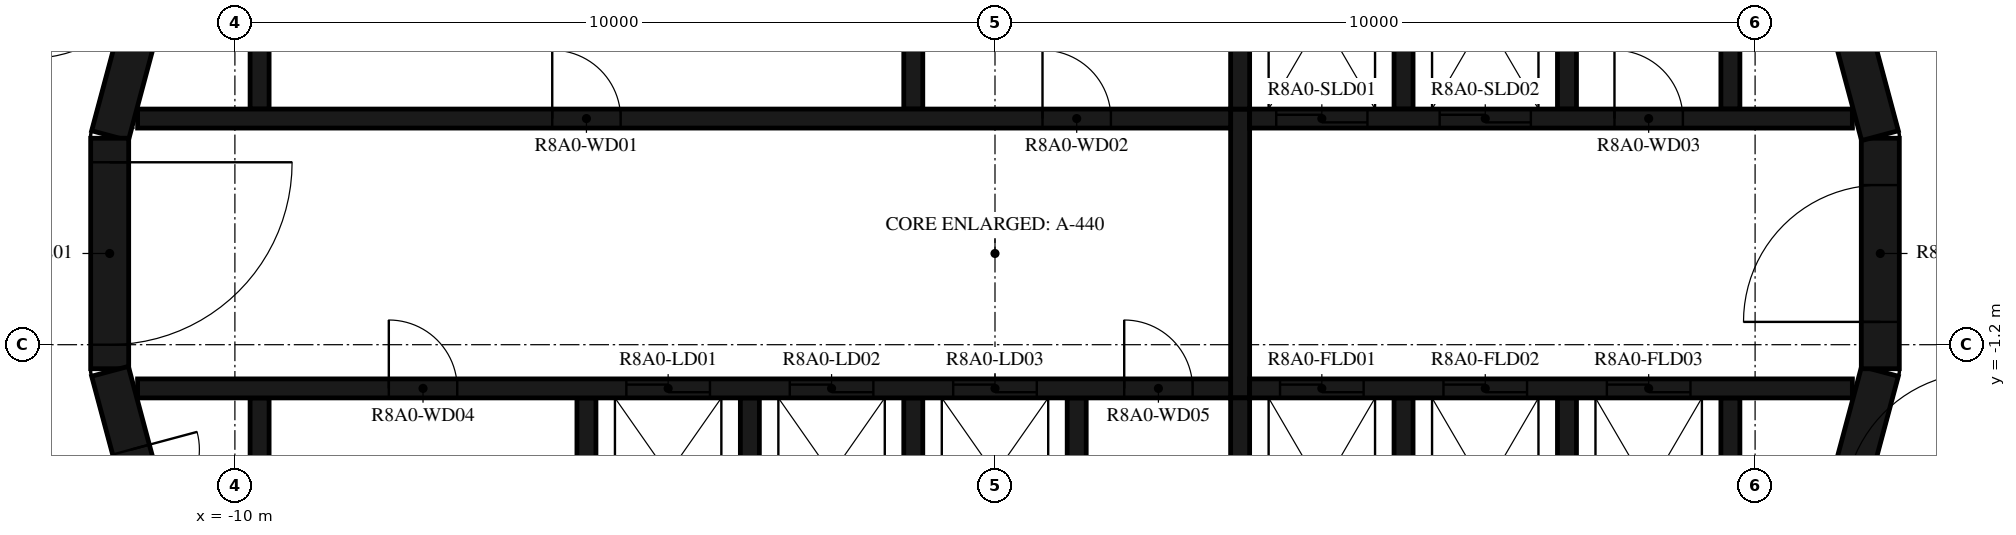
"""IFC4 building model, lengths in metres.
Left out: names, types, materials, properties, quantities, classifications, styles, units other than length and angle.
Written with IfcOpenShell. Run it as: python <this file> out.ifc"""

import sys

from ifc_helpers import new_model, si_unit, direction, frame, frame_2d, origin, place, context, subcontext, project, spatial, polyline, rectangle, outline, extrude, element, fill, save


model = new_model("IFC4")
c1 = context("Model", 3, precision=1e-05, world=origin(), true_north=direction((0.0, 1.0)))
c2 = subcontext(c1, "Body", "Model", "MODEL_VIEW")
j1 = project(units=[si_unit("LENGTHUNIT", "METRE"), si_unit("PLANEANGLEUNIT", "RADIAN")], contexts=[c1])
p1 = place(None, origin())
s1 = spatial("IfcSite", under=j1, at=p1, CompositionType="ELEMENT")
p2 = place(p1, origin())
s2 = spatial("IfcBuilding", under=s1, at=p2, CompositionType="ELEMENT")
p3 = place(p2, frame((0.0, 0.0, 305.2)))
s3 = spatial("IfcBuildingStorey", under=s2, at=p3, CompositionType="ELEMENT", Elevation=305.2)
p4 = place(p3, frame((10.858, -4.479, 0.0), z_axis=(0.0, 0.0, 1.0), x_axis=(0.258734743916, 0.965948410781, 0.0)))
e1 = element("IfcWall", 1, at=p4, inside=s3, PredefinedType="SHEAR", context=c2, shape_type="SweptSolid", body=[
    extrude(rectangle(XDim=3.033, YDim=0.5, at=frame_2d((1.516, 0.0))), origin(), (0.0, 0.0, 1.0), 3.12),
])
p5 = place(p3, frame((11.647, -1.516, 0.0), z_axis=(0.0, 0.0, 1.0), x_axis=(0.0, 1.0, 0.0)))
e2 = element("IfcWall", 2, at=p5, inside=s3, PredefinedType="SHEAR", context=c2, shape_type="SweptSolid", body=[
    extrude(rectangle(XDim=3.033, YDim=0.5, at=frame_2d((1.516, 0.0))), origin(), (0.0, 0.0, 1.0), 3.12),
])
p6 = place(p5, frame((0.616, 0.0, 0.0)))
e3 = element("IfcOpeningElement", 3, at=p6, cuts=e2, PredefinedType="OPENING", context=c2, shape_type="SweptSolid", body=[
    extrude(rectangle(XDim=1.8, YDim=2.1, at=frame_2d((0.9, 1.05))), frame((0.0, 0.26, 0.0), z_axis=(0.0, -1.0, 0.0), x_axis=(1.0, 0.0, 0.0)), (0.0, 0.0, 1.0), 0.52),
])
for number, where, z_axis, x_axis in (
    (4, (11.643, 1.55, 0.0), (0.0, 0.0, 1.0), (-0.259, 0.966, 0.0)),
    (5, (-10.858, 4.479, 0.0), (0.0, 0.0, 1.0), (-0.259, -0.966, 0.0)),
):
    element("IfcWall", number, at=place(p3, frame(where, z_axis=z_axis, x_axis=x_axis)), inside=s3, PredefinedType="SHEAR", context=c2, shape_type="SweptSolid", body=[
        extrude(rectangle(XDim=3.033, YDim=0.5, at=frame_2d((1.516, 0.0))), origin(), (0.0, 0.0, 1.0), 3.12),
    ])
p7 = place(p3, frame((-11.647, 1.516, 0.0), z_axis=(0.0, 0.0, 1.0), x_axis=(0.0, -1.0, 0.0)))
e6 = element("IfcWall", 6, at=p7, inside=s3, PredefinedType="SHEAR", context=c2, shape_type="SweptSolid", body=[
    extrude(rectangle(XDim=3.033, YDim=0.5, at=frame_2d((1.516, 0.0))), origin(), (0.0, 0.0, 1.0), 3.12),
])
p8 = place(p7, frame((0.316, 0.0, 0.0)))
e7 = element("IfcOpeningElement", 7, at=p8, cuts=e6, PredefinedType="OPENING", context=c2, shape_type="SweptSolid", body=[
    extrude(rectangle(XDim=2.4, YDim=2.1, at=frame_2d((1.2, 1.05))), frame((0.0, 0.26, 0.0), z_axis=(0.0, -1.0, 0.0), x_axis=(1.0, 0.0, 0.0)), (0.0, 0.0, 1.0), 0.52),
])
p9 = place(p3, frame((-11.643, -1.55, 0.0), z_axis=(0.0, 0.0, 1.0), x_axis=(0.258734743916, -0.965948410781, 0.0)))
e8 = element("IfcWall", 8, at=p9, inside=s3, PredefinedType="SHEAR", context=c2, shape_type="SweptSolid", body=[
    extrude(rectangle(XDim=3.033, YDim=0.5, at=frame_2d((1.516, 0.0))), origin(), (0.0, 0.0, 1.0), 3.12),
])
p10 = place(p9, frame((1.066, 0.0, 0.0)))
e9 = element("IfcOpeningElement", 9, at=p10, cuts=e8, PredefinedType="OPENING", context=c2, shape_type="SweptSolid", body=[
    extrude(rectangle(XDim=0.9, YDim=2.1, at=frame_2d((0.45, 1.05))), frame((0.0, 0.26, 0.0), z_axis=(0.0, -1.0, 0.0), x_axis=(1.0, 0.0, 0.0)), (0.0, 0.0, 1.0), 0.52),
])
p11 = place(p3, origin())
e10 = element("IfcWall", 10, at=p11, inside=s3, PredefinedType="SHEAR", context=c2, shape_type="SweptSolid", body=[
    extrude(outline(polyline([(-9.8, 1.9), (-9.55, 1.9), (-9.55, 4.8), (-1.2, 4.8), (-1.2, 1.9), (-0.95, 1.9), (-0.95, 4.8), (3.1, 4.8), (3.1, 1.9), (3.35, 1.9), (3.35, 4.8), (5.25, 4.8), (5.25, 1.9), (5.5, 1.9), (5.5, 4.8), (7.4, 4.8), (7.4, 1.9), (7.65, 1.9), (7.65, 4.8), (9.55, 4.8), (9.55, 1.9), (9.8, 1.9), (9.8, 4.8), (9.8, 5.05), (-9.8, 5.05), (-9.8, 4.8), (-9.8, 1.9)])), origin(), (0.0, 0.0, 1.0), 3.12),
])
p12 = place(p3, origin())
e11 = element("IfcWall", 11, at=p12, inside=s3, PredefinedType="SHEAR", context=c2, shape_type="SweptSolid", body=[
    extrude(outline(polyline([(9.8, -5.05), (9.8, -4.8), (9.8, -1.9), (9.55, -1.9), (9.55, -4.8), (7.65, -4.8), (7.65, -1.9), (7.4, -1.9), (7.4, -4.8), (5.5, -4.8), (5.5, -1.9), (5.25, -1.9), (5.25, -4.8), (3.35, -4.8), (3.35, -1.9), (3.1, -1.9), (3.1, -4.8), (1.2, -4.8), (1.2, -1.9), (0.95, -1.9), (0.95, -4.8), (-0.95, -4.8), (-0.95, -1.9), (-1.2, -1.9), (-1.2, -4.8), (-3.1, -4.8), (-3.1, -1.9), (-3.35, -1.9), (-3.35, -4.8), (-5.25, -4.8), (-5.25, -1.9), (-5.5, -1.9), (-5.5, -4.8), (-9.55, -4.8), (-9.55, -1.9), (-9.8, -1.9), (-9.8, -4.8), (-9.8, -5.05), (9.8, -5.05)])), origin(), (0.0, 0.0, 1.0), 3.12),
])
p13 = place(p3, frame((-11.28, 1.775, 0.0), z_axis=(0.0, 0.0, 1.0), x_axis=(1.0, 0.0, 0.0)))
e12 = element("IfcWall", 12, at=p13, inside=s3, PredefinedType="SHEAR", context=c2, shape_type="SweptSolid", body=[
    extrude(rectangle(XDim=14.38, YDim=0.25, at=frame_2d((7.19, 0.0))), origin(), (0.0, 0.0, 1.0), 3.12),
])
p14 = place(p13, frame((5.455, 0.0, 0.0)))
e13 = element("IfcOpeningElement", 13, at=p14, cuts=e12, PredefinedType="OPENING", context=c2, shape_type="SweptSolid", body=[
    extrude(rectangle(XDim=0.9, YDim=2.1, at=frame_2d((0.45, 1.05))), frame((0.0, 0.135, 0.0), z_axis=(0.0, -1.0, 0.0), x_axis=(1.0, 0.0, 0.0)), (0.0, 0.0, 1.0), 0.27),
])
p15 = place(p13, frame((11.905, 0.0, 0.0)))
e14 = element("IfcOpeningElement", 14, at=p15, cuts=e12, PredefinedType="OPENING", context=c2, shape_type="SweptSolid", body=[
    extrude(rectangle(XDim=0.9, YDim=2.1, at=frame_2d((0.45, 1.05))), frame((0.0, 0.135, 0.0), z_axis=(0.0, -1.0, 0.0), x_axis=(1.0, 0.0, 0.0)), (0.0, 0.0, 1.0), 0.27),
])
p16 = place(p3, frame((3.35, 1.775, 0.0), z_axis=(0.0, 0.0, 1.0), x_axis=(1.0, 0.0, 0.0)))
e15 = element("IfcWall", 15, at=p16, inside=s3, PredefinedType="SHEAR", context=c2, shape_type="SweptSolid", body=[
    extrude(rectangle(XDim=7.93, YDim=0.25, at=frame_2d((3.965, 0.0))), origin(), (0.0, 0.0, 1.0), 3.12),
])
p17 = place(p16, frame((0.35, 0.0, 0.0)))
e16 = element("IfcOpeningElement", 16, at=p17, cuts=e15, PredefinedType="OPENING", context=c2, shape_type="SweptSolid", body=[
    extrude(rectangle(XDim=1.2, YDim=2.4, at=frame_2d((0.6, 1.2))), frame((0.0, 0.135, 0.0), z_axis=(0.0, -1.0, 0.0), x_axis=(1.0, 0.0, 0.0)), (0.0, 0.0, 1.0), 0.27),
])
p18 = place(p16, frame((2.5, 0.0, 0.0)))
e17 = element("IfcOpeningElement", 17, at=p18, cuts=e15, PredefinedType="OPENING", context=c2, shape_type="SweptSolid", body=[
    extrude(rectangle(XDim=1.2, YDim=2.4, at=frame_2d((0.6, 1.2))), frame((0.0, 0.135, 0.0), z_axis=(0.0, -1.0, 0.0), x_axis=(1.0, 0.0, 0.0)), (0.0, 0.0, 1.0), 0.27),
])
p19 = place(p16, frame((4.8, 0.0, 0.0)))
e18 = element("IfcOpeningElement", 18, at=p19, cuts=e15, PredefinedType="OPENING", context=c2, shape_type="SweptSolid", body=[
    extrude(rectangle(XDim=0.9, YDim=2.1, at=frame_2d((0.45, 1.05))), frame((0.0, 0.135, 0.0), z_axis=(0.0, -1.0, 0.0), x_axis=(1.0, 0.0, 0.0)), (0.0, 0.0, 1.0), 0.27),
])
p20 = place(p3, frame((-11.28, -1.775, 0.0), z_axis=(0.0, 0.0, 1.0), x_axis=(1.0, 0.0, 0.0)))
e19 = element("IfcWall", 19, at=p20, inside=s3, PredefinedType="SHEAR", context=c2, shape_type="SweptSolid", body=[
    extrude(rectangle(XDim=14.38, YDim=0.25, at=frame_2d((7.19, 0.0))), origin(), (0.0, 0.0, 1.0), 3.12),
])
p21 = place(p20, frame((6.43, 0.0, 0.0)))
e20 = element("IfcOpeningElement", 20, at=p21, cuts=e19, PredefinedType="OPENING", context=c2, shape_type="SweptSolid", body=[
    extrude(rectangle(XDim=1.1, YDim=2.1, at=frame_2d((0.55, 1.05))), frame((0.0, 0.135, 0.0), z_axis=(0.0, -1.0, 0.0), x_axis=(1.0, 0.0, 0.0)), (0.0, 0.0, 1.0), 0.27),
])
p22 = place(p20, frame((8.58, 0.0, 0.0)))
e21 = element("IfcOpeningElement", 21, at=p22, cuts=e19, PredefinedType="OPENING", context=c2, shape_type="SweptSolid", body=[
    extrude(rectangle(XDim=1.1, YDim=2.1, at=frame_2d((0.55, 1.05))), frame((0.0, 0.135, 0.0), z_axis=(0.0, -1.0, 0.0), x_axis=(1.0, 0.0, 0.0)), (0.0, 0.0, 1.0), 0.27),
])
p23 = place(p20, frame((10.73, 0.0, 0.0)))
e22 = element("IfcOpeningElement", 22, at=p23, cuts=e19, PredefinedType="OPENING", context=c2, shape_type="SweptSolid", body=[
    extrude(rectangle(XDim=1.1, YDim=2.1, at=frame_2d((0.55, 1.05))), frame((0.0, 0.135, 0.0), z_axis=(0.0, -1.0, 0.0), x_axis=(1.0, 0.0, 0.0)), (0.0, 0.0, 1.0), 0.27),
])
p24 = place(p20, frame((3.305, 0.0, 0.0)))
e23 = element("IfcOpeningElement", 23, at=p24, cuts=e19, PredefinedType="OPENING", context=c2, shape_type="SweptSolid", body=[
    extrude(rectangle(XDim=0.9, YDim=2.1, at=frame_2d((0.45, 1.05))), frame((0.0, 0.135, 0.0), z_axis=(0.0, -1.0, 0.0), x_axis=(1.0, 0.0, 0.0)), (0.0, 0.0, 1.0), 0.27),
])
p25 = place(p20, frame((12.98, 0.0, 0.0)))
e24 = element("IfcOpeningElement", 24, at=p25, cuts=e19, PredefinedType="OPENING", context=c2, shape_type="SweptSolid", body=[
    extrude(rectangle(XDim=0.9, YDim=2.1, at=frame_2d((0.45, 1.05))), frame((0.0, 0.135, 0.0), z_axis=(0.0, -1.0, 0.0), x_axis=(1.0, 0.0, 0.0)), (0.0, 0.0, 1.0), 0.27),
])
p26 = place(p3, frame((3.35, -1.775, 0.0), z_axis=(0.0, 0.0, 1.0), x_axis=(1.0, 0.0, 0.0)))
e25 = element("IfcWall", 25, at=p26, inside=s3, PredefinedType="SHEAR", context=c2, shape_type="SweptSolid", body=[
    extrude(rectangle(XDim=7.93, YDim=0.25, at=frame_2d((3.965, 0.0))), origin(), (0.0, 0.0, 1.0), 3.12),
])
p27 = place(p26, frame((0.4, 0.0, 0.0)))
e26 = element("IfcOpeningElement", 26, at=p27, cuts=e25, PredefinedType="OPENING", context=c2, shape_type="SweptSolid", body=[
    extrude(rectangle(XDim=1.1, YDim=2.4, at=frame_2d((0.55, 1.2))), frame((0.0, 0.135, 0.0), z_axis=(0.0, -1.0, 0.0), x_axis=(1.0, 0.0, 0.0)), (0.0, 0.0, 1.0), 0.27),
])
p28 = place(p26, frame((2.55, 0.0, 0.0)))
e27 = element("IfcOpeningElement", 27, at=p28, cuts=e25, PredefinedType="OPENING", context=c2, shape_type="SweptSolid", body=[
    extrude(rectangle(XDim=1.1, YDim=2.4, at=frame_2d((0.55, 1.2))), frame((0.0, 0.135, 0.0), z_axis=(0.0, -1.0, 0.0), x_axis=(1.0, 0.0, 0.0)), (0.0, 0.0, 1.0), 0.27),
])
p29 = place(p26, frame((4.7, 0.0, 0.0)))
e28 = element("IfcOpeningElement", 28, at=p29, cuts=e25, PredefinedType="OPENING", context=c2, shape_type="SweptSolid", body=[
    extrude(rectangle(XDim=1.1, YDim=2.4, at=frame_2d((0.55, 1.2))), frame((0.0, 0.135, 0.0), z_axis=(0.0, -1.0, 0.0), x_axis=(1.0, 0.0, 0.0)), (0.0, 0.0, 1.0), 0.27),
])
p30 = place(p3, frame((3.225, -1.9, 0.0), z_axis=(0.0, 0.0, 1.0), x_axis=(0.0, 1.0, 0.0)))
e29 = element("IfcWall", 29, at=p30, inside=s3, PredefinedType="SHEAR", context=c2, shape_type="SweptSolid", body=[
    extrude(rectangle(XDim=3.8, YDim=0.25, at=frame_2d((1.9, 0.0))), origin(), (0.0, 0.0, 1.0), 3.12),
])
p31 = place(p3, frame((12.074, -6.831, 0.0), z_axis=(0.0, 0.0, 1.0), x_axis=(0.250391063186, 0.968144780225, 0.0)))
e30 = element("IfcWall", 30, at=p31, inside=s3, PredefinedType="STANDARD", context=c2, shape_type="SweptSolid", body=[
    extrude(rectangle(XDim=7.181, YDim=0.2, at=frame_2d((3.591, 0.0))), origin(), (0.0, 0.0, 1.0), 3.12),
])
p32 = place(p31, frame((3.581, 0.0, 0.0)))
e31 = element("IfcOpeningElement", 31, at=p32, cuts=e30, PredefinedType="OPENING", context=c2, shape_type="SweptSolid", body=[
    extrude(rectangle(XDim=1.8, YDim=2.1, at=frame_2d((0.9, 1.05))), frame((0.0, 0.11, 0.0), z_axis=(0.0, -1.0, 0.0), x_axis=(1.0, 0.0, 0.0)), (0.0, 0.0, 1.0), 0.22),
])
p33 = place(p3, frame((-12.074, 6.831, 0.0), z_axis=(0.0, 0.0, 1.0), x_axis=(-0.250391063186, -0.968144780225, 0.0)))
e32 = element("IfcWall", 32, at=p33, inside=s3, PredefinedType="STANDARD", context=c2, shape_type="SweptSolid", body=[
    extrude(rectangle(XDim=7.181, YDim=0.2, at=frame_2d((3.591, 0.0))), origin(), (0.0, 0.0, 1.0), 3.12),
])
p34 = place(p33, frame((2.548, 0.0, 0.0)))
e33 = element("IfcOpeningElement", 33, at=p34, cuts=e32, PredefinedType="OPENING", context=c2, shape_type="SweptSolid", body=[
    extrude(rectangle(XDim=1.8, YDim=2.1, at=frame_2d((0.9, 1.05))), frame((0.0, 0.11, 0.0), z_axis=(0.0, -1.0, 0.0), x_axis=(1.0, 0.0, 0.0)), (0.0, 0.0, 1.0), 0.22),
])
p35 = place(p3, frame((-13.872, -0.121, 0.0), z_axis=(0.0, 0.0, 1.0), x_axis=(0.267254575108, -0.963625960674, 0.0)))
e34 = element("IfcWall", 34, at=p35, inside=s3, PredefinedType="STANDARD", context=c2, shape_type="SweptSolid", body=[
    extrude(rectangle(XDim=7.181, YDim=0.2, at=frame_2d((3.591, 0.0))), origin(), (0.0, 0.0, 1.0), 3.12),
])
p36 = place(p8, origin())
e35 = element("IfcDoor", 35, at=p36, inside=s3, OperationType="DOUBLE_DOOR_SINGLE_SWING", PredefinedType="DOOR", context=c2, shape_type="SweptSolid", body=[
    extrude(rectangle(XDim=2.4, YDim=2.1, at=frame_2d((1.2, 1.05))), frame((0.0, 0.025, 0.0), z_axis=(0.0, -1.0, 0.0), x_axis=(1.0, 0.0, 0.0)), (0.0, 0.0, 1.0), 0.05),
])
fill(e7, e35)
p37 = place(p6, origin())
e36 = element("IfcDoor", 36, at=p37, inside=s3, OperationType="DOUBLE_DOOR_SINGLE_SWING", PredefinedType="DOOR", context=c2, shape_type="SweptSolid", body=[
    extrude(rectangle(XDim=1.8, YDim=2.1, at=frame_2d((0.9, 1.05))), frame((0.0, 0.025, 0.0), z_axis=(0.0, -1.0, 0.0), x_axis=(1.0, 0.0, 0.0)), (0.0, 0.0, 1.0), 0.05),
])
fill(e3, e36)
p38 = place(p17, origin())
e37 = element("IfcDoor", 37, at=p38, inside=s3, OperationType="DOUBLE_DOOR_SLIDING", PredefinedType="DOOR", context=c2, shape_type="SweptSolid", body=[
    extrude(rectangle(XDim=1.2, YDim=2.4, at=frame_2d((0.6, 1.2))), frame((0.0, 0.025, 0.0), z_axis=(0.0, -1.0, 0.0), x_axis=(1.0, 0.0, 0.0)), (0.0, 0.0, 1.0), 0.05),
])
fill(e16, e37)
p39 = place(p18, origin())
e38 = element("IfcDoor", 38, at=p39, inside=s3, OperationType="DOUBLE_DOOR_SLIDING", PredefinedType="DOOR", context=c2, shape_type="SweptSolid", body=[
    extrude(rectangle(XDim=1.2, YDim=2.4, at=frame_2d((0.6, 1.2))), frame((0.0, 0.025, 0.0), z_axis=(0.0, -1.0, 0.0), x_axis=(1.0, 0.0, 0.0)), (0.0, 0.0, 1.0), 0.05),
])
fill(e17, e38)
p40 = place(p21, origin())
e39 = element("IfcDoor", 39, at=p40, inside=s3, OperationType="DOUBLE_DOOR_SLIDING", PredefinedType="DOOR", context=c2, shape_type="SweptSolid", body=[
    extrude(rectangle(XDim=1.1, YDim=2.1, at=frame_2d((0.55, 1.05))), frame((0.0, 0.025, 0.0), z_axis=(0.0, -1.0, 0.0), x_axis=(1.0, 0.0, 0.0)), (0.0, 0.0, 1.0), 0.05),
])
fill(e20, e39)
p41 = place(p22, origin())
e40 = element("IfcDoor", 40, at=p41, inside=s3, OperationType="DOUBLE_DOOR_SLIDING", PredefinedType="DOOR", context=c2, shape_type="SweptSolid", body=[
    extrude(rectangle(XDim=1.1, YDim=2.1, at=frame_2d((0.55, 1.05))), frame((0.0, 0.025, 0.0), z_axis=(0.0, -1.0, 0.0), x_axis=(1.0, 0.0, 0.0)), (0.0, 0.0, 1.0), 0.05),
])
fill(e21, e40)
p42 = place(p23, origin())
e41 = element("IfcDoor", 41, at=p42, inside=s3, OperationType="DOUBLE_DOOR_SLIDING", PredefinedType="DOOR", context=c2, shape_type="SweptSolid", body=[
    extrude(rectangle(XDim=1.1, YDim=2.1, at=frame_2d((0.55, 1.05))), frame((0.0, 0.025, 0.0), z_axis=(0.0, -1.0, 0.0), x_axis=(1.0, 0.0, 0.0)), (0.0, 0.0, 1.0), 0.05),
])
fill(e22, e41)
p43 = place(p27, origin())
e42 = element("IfcDoor", 42, at=p43, inside=s3, OperationType="DOUBLE_DOOR_SLIDING", PredefinedType="DOOR", context=c2, shape_type="SweptSolid", body=[
    extrude(rectangle(XDim=1.1, YDim=2.4, at=frame_2d((0.55, 1.2))), frame((0.0, 0.025, 0.0), z_axis=(0.0, -1.0, 0.0), x_axis=(1.0, 0.0, 0.0)), (0.0, 0.0, 1.0), 0.05),
])
fill(e26, e42)
p44 = place(p28, origin())
e43 = element("IfcDoor", 43, at=p44, inside=s3, OperationType="DOUBLE_DOOR_SLIDING", PredefinedType="DOOR", context=c2, shape_type="SweptSolid", body=[
    extrude(rectangle(XDim=1.1, YDim=2.4, at=frame_2d((0.55, 1.2))), frame((0.0, 0.025, 0.0), z_axis=(0.0, -1.0, 0.0), x_axis=(1.0, 0.0, 0.0)), (0.0, 0.0, 1.0), 0.05),
])
fill(e27, e43)
p45 = place(p29, origin())
e44 = element("IfcDoor", 44, at=p45, inside=s3, OperationType="DOUBLE_DOOR_SLIDING", PredefinedType="DOOR", context=c2, shape_type="SweptSolid", body=[
    extrude(rectangle(XDim=1.1, YDim=2.4, at=frame_2d((0.55, 1.2))), frame((0.0, 0.025, 0.0), z_axis=(0.0, -1.0, 0.0), x_axis=(1.0, 0.0, 0.0)), (0.0, 0.0, 1.0), 0.05),
])
fill(e28, e44)
p46 = place(p14, origin())
e45 = element("IfcDoor", 45, at=p46, inside=s3, OperationType="SINGLE_SWING_LEFT", PredefinedType="DOOR", context=c2, shape_type="SweptSolid", body=[
    extrude(rectangle(XDim=0.9, YDim=2.1, at=frame_2d((0.45, 1.05))), frame((0.0, 0.025, 0.0), z_axis=(0.0, -1.0, 0.0), x_axis=(1.0, 0.0, 0.0)), (0.0, 0.0, 1.0), 0.05),
])
fill(e13, e45)
p47 = place(p15, origin())
e46 = element("IfcDoor", 46, at=p47, inside=s3, OperationType="SINGLE_SWING_RIGHT", PredefinedType="DOOR", context=c2, shape_type="SweptSolid", body=[
    extrude(rectangle(XDim=0.9, YDim=2.1, at=frame_2d((0.45, 1.05))), frame((0.0, 0.025, 0.0), z_axis=(0.0, -1.0, 0.0), x_axis=(1.0, 0.0, 0.0)), (0.0, 0.0, 1.0), 0.05),
])
fill(e14, e46)
p48 = place(p19, origin())
e47 = element("IfcDoor", 47, at=p48, inside=s3, OperationType="SINGLE_SWING_LEFT", PredefinedType="DOOR", context=c2, shape_type="SweptSolid", body=[
    extrude(rectangle(XDim=0.9, YDim=2.1, at=frame_2d((0.45, 1.05))), frame((0.0, 0.025, 0.0), z_axis=(0.0, -1.0, 0.0), x_axis=(1.0, 0.0, 0.0)), (0.0, 0.0, 1.0), 0.05),
])
fill(e18, e47)
p49 = place(p24, origin())
e48 = element("IfcDoor", 48, at=p49, inside=s3, OperationType="SINGLE_SWING_RIGHT", PredefinedType="DOOR", context=c2, shape_type="SweptSolid", body=[
    extrude(rectangle(XDim=0.9, YDim=2.1, at=frame_2d((0.45, 1.05))), frame((0.0, 0.025, 0.0), z_axis=(0.0, -1.0, 0.0), x_axis=(1.0, 0.0, 0.0)), (0.0, 0.0, 1.0), 0.05),
])
fill(e23, e48)
p50 = place(p25, origin())
e49 = element("IfcDoor", 49, at=p50, inside=s3, OperationType="SINGLE_SWING_LEFT", PredefinedType="DOOR", context=c2, shape_type="SweptSolid", body=[
    extrude(rectangle(XDim=0.9, YDim=2.1, at=frame_2d((0.45, 1.05))), frame((0.0, 0.025, 0.0), z_axis=(0.0, -1.0, 0.0), x_axis=(1.0, 0.0, 0.0)), (0.0, 0.0, 1.0), 0.05),
])
fill(e24, e49)
p51 = place(p10, origin())
e50 = element("IfcDoor", 50, at=p51, inside=s3, OperationType="SINGLE_SWING_RIGHT", PredefinedType="DOOR", context=c2, shape_type="SweptSolid", body=[
    extrude(rectangle(XDim=0.9, YDim=2.1, at=frame_2d((0.45, 1.05))), frame((0.0, 0.025, 0.0), z_axis=(0.0, -1.0, 0.0), x_axis=(1.0, 0.0, 0.0)), (0.0, 0.0, 1.0), 0.05),
])
fill(e9, e50)
save(model, sys.argv[1])
